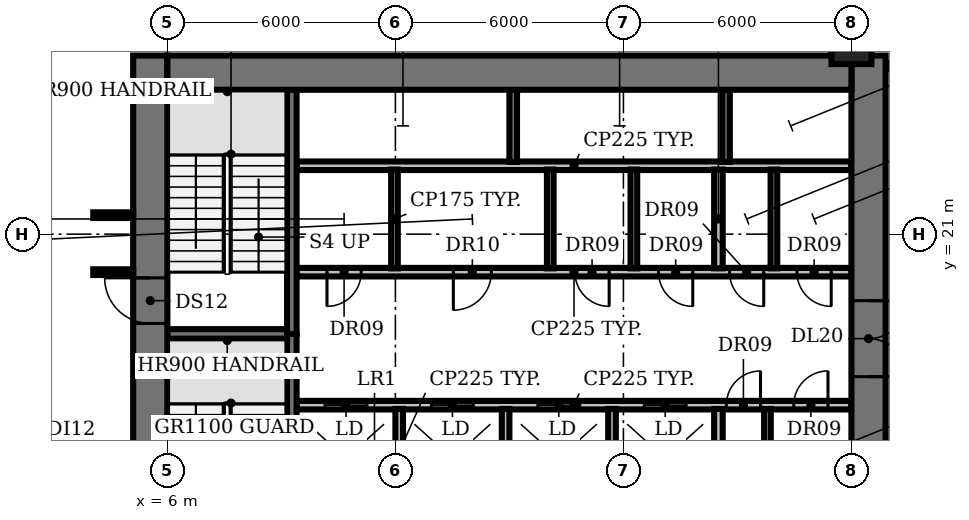
"""IFC4 building model, lengths in metres.
Left out: names, types, materials, properties, quantities, classifications, styles, units other than length and angle.
Written with IfcOpenShell. Run it as: python <this file> out.ifc"""

import sys

from ifc_helpers import new_model, si_unit, direction, frame, frame_2d, origin, origin_2d, place, context, subcontext, project, spatial, rectangle, circle, extrude, element, fill, save


model = new_model("IFC4")
c1 = context("Model", 3, precision=1e-05, world=origin(), true_north=direction((0.0, 1.0)))
c2 = subcontext(c1, "Body", "Model", "MODEL_VIEW")
j1 = project(units=[si_unit("LENGTHUNIT", "METRE"), si_unit("PLANEANGLEUNIT", "RADIAN")], contexts=[c1])
p1 = place(None, origin())
s1 = spatial("IfcSite", under=j1, at=p1, CompositionType="ELEMENT")
p2 = place(p1, origin())
s2 = spatial("IfcBuilding", under=s1, at=p2, CompositionType="ELEMENT")
p3 = place(p2, frame((0.0, 0.0, 29.0)))
s3 = spatial("IfcBuildingStorey", under=s2, at=p3, CompositionType="ELEMENT", Elevation=29.0)
p4 = place(p3, frame((24.0, 26.0, 0.0), z_axis=(0.0, 0.0, 1.0), x_axis=(1.0, 0.0, 0.0)))
e1 = element("IfcColumn", 1, at=p4, inside=s3, PredefinedType="COLUMN", context=c2, shape_type="SweptSolid", body=[
    extrude(circle(Radius=0.525, at=origin_2d()), origin(), (0.0, 0.0, 1.0), 3.85),
])
p5 = place(p3, frame((9.4, 16.5, 0.0), z_axis=(0.0, 0.0, 1.0), x_axis=(1.0, 0.0, 0.0)))
e2 = element("IfcWall", 2, at=p5, inside=s3, PredefinedType="PARTITIONING", context=c2, shape_type="SweptSolid", body=[
    extrude(rectangle(XDim=14.6, YDim=0.225, at=frame_2d((7.3, 0.0))), origin(), (0.0, 0.0, 1.0), 3.85),
])
p6 = place(p5, frame((0.75, 0.0, 0.0)))
e3 = element("IfcOpeningElement", 3, at=p6, cuts=e2, PredefinedType="OPENING", context=c2, shape_type="SweptSolid", body=[
    extrude(rectangle(XDim=1.1, YDim=2.1, at=frame_2d((0.55, 1.05))), frame((0.0, 0.123, 0.0), z_axis=(0.0, -1.0, 0.0), x_axis=(1.0, 0.0, 0.0)), (0.0, 0.0, 1.0), 0.245),
])
p7 = place(p5, frame((3.55, 0.0, 0.0)))
e4 = element("IfcOpeningElement", 4, at=p7, cuts=e2, PredefinedType="OPENING", context=c2, shape_type="SweptSolid", body=[
    extrude(rectangle(XDim=1.1, YDim=2.1, at=frame_2d((0.55, 1.05))), frame((0.0, 0.123, 0.0), z_axis=(0.0, -1.0, 0.0), x_axis=(1.0, 0.0, 0.0)), (0.0, 0.0, 1.0), 0.245),
])
p8 = place(p5, frame((6.35, 0.0, 0.0)))
e5 = element("IfcOpeningElement", 5, at=p8, cuts=e2, PredefinedType="OPENING", context=c2, shape_type="SweptSolid", body=[
    extrude(rectangle(XDim=1.1, YDim=2.1, at=frame_2d((0.55, 1.05))), frame((0.0, 0.123, 0.0), z_axis=(0.0, -1.0, 0.0), x_axis=(1.0, 0.0, 0.0)), (0.0, 0.0, 1.0), 0.245),
])
p9 = place(p5, frame((9.15, 0.0, 0.0)))
e6 = element("IfcOpeningElement", 6, at=p9, cuts=e2, PredefinedType="OPENING", context=c2, shape_type="SweptSolid", body=[
    extrude(rectangle(XDim=1.1, YDim=2.1, at=frame_2d((0.55, 1.05))), frame((0.0, 0.123, 0.0), z_axis=(0.0, -1.0, 0.0), x_axis=(1.0, 0.0, 0.0)), (0.0, 0.0, 1.0), 0.245),
])
p10 = place(p5, frame((11.308, 0.0, 0.0)))
e7 = element("IfcOpeningElement", 7, at=p10, cuts=e2, PredefinedType="OPENING", context=c2, shape_type="SweptSolid", body=[
    extrude(rectangle(XDim=0.9, YDim=2.1, at=frame_2d((0.45, 1.05))), frame((0.0, 0.123, 0.0), z_axis=(0.0, -1.0, 0.0), x_axis=(1.0, 0.0, 0.0)), (0.0, 0.0, 1.0), 0.245),
])
p11 = place(p5, frame((13.083, 0.0, 0.0)))
e8 = element("IfcOpeningElement", 8, at=p11, cuts=e2, PredefinedType="OPENING", context=c2, shape_type="SweptSolid", body=[
    extrude(rectangle(XDim=0.9, YDim=2.1, at=frame_2d((0.45, 1.05))), frame((0.0, 0.123, 0.0), z_axis=(0.0, -1.0, 0.0), x_axis=(1.0, 0.0, 0.0)), (0.0, 0.0, 1.0), 0.245),
])
p12 = place(p3, frame((6.0, 18.375, 0.0), z_axis=(0.0, 0.0, 1.0), x_axis=(1.0, 0.0, 0.0)))
e9 = element("IfcWall", 9, at=p12, inside=s3, PredefinedType="SHEAR", context=c2, shape_type="SweptSolid", body=[
    extrude(rectangle(XDim=3.15, YDim=0.25, at=frame_2d((1.575, 0.0))), origin(), (0.0, 0.0, 1.0), 3.85),
])
p13 = place(p3, frame((24.0, 20.0, 0.0), z_axis=(0.0, 0.0, 1.0), x_axis=(-1.0, 0.0, 0.0)))
e10 = element("IfcWall", 10, at=p13, inside=s3, PredefinedType="PARTITIONING", context=c2, shape_type="SweptSolid", body=[
    extrude(rectangle(XDim=14.6, YDim=0.225, at=frame_2d((7.3, 0.0))), origin(), (0.0, 0.0, 1.0), 3.85),
])
p14 = place(p13, frame((12.9, 0.0, 0.0)))
e11 = element("IfcOpeningElement", 11, at=p14, cuts=e10, PredefinedType="OPENING", context=c2, shape_type="SweptSolid", body=[
    extrude(rectangle(XDim=0.9, YDim=2.1, at=frame_2d((0.45, 1.05))), frame((0.0, 0.123, 0.0), z_axis=(0.0, -1.0, 0.0), x_axis=(1.0, 0.0, 0.0)), (0.0, 0.0, 1.0), 0.245),
])
p15 = place(p13, frame((9.475, 0.0, 0.0)))
e12 = element("IfcOpeningElement", 12, at=p15, cuts=e10, PredefinedType="OPENING", context=c2, shape_type="SweptSolid", body=[
    extrude(rectangle(XDim=1.0, YDim=2.1, at=frame_2d((0.5, 1.05))), frame((0.0, 0.123, 0.0), z_axis=(0.0, -1.0, 0.0), x_axis=(1.0, 0.0, 0.0)), (0.0, 0.0, 1.0), 0.245),
])
p16 = place(p13, frame((6.375, 0.0, 0.0)))
e13 = element("IfcOpeningElement", 13, at=p16, cuts=e10, PredefinedType="OPENING", context=c2, shape_type="SweptSolid", body=[
    extrude(rectangle(XDim=0.9, YDim=2.1, at=frame_2d((0.45, 1.05))), frame((0.0, 0.123, 0.0), z_axis=(0.0, -1.0, 0.0), x_axis=(1.0, 0.0, 0.0)), (0.0, 0.0, 1.0), 0.245),
])
p17 = place(p13, frame((4.175, 0.0, 0.0)))
e14 = element("IfcOpeningElement", 14, at=p17, cuts=e10, PredefinedType="OPENING", context=c2, shape_type="SweptSolid", body=[
    extrude(rectangle(XDim=0.9, YDim=2.1, at=frame_2d((0.45, 1.05))), frame((0.0, 0.123, 0.0), z_axis=(0.0, -1.0, 0.0), x_axis=(1.0, 0.0, 0.0)), (0.0, 0.0, 1.0), 0.245),
])
p18 = place(p13, frame((2.308, 0.0, 0.0)))
e15 = element("IfcOpeningElement", 15, at=p18, cuts=e10, PredefinedType="OPENING", context=c2, shape_type="SweptSolid", body=[
    extrude(rectangle(XDim=0.9, YDim=2.1, at=frame_2d((0.45, 1.05))), frame((0.0, 0.123, 0.0), z_axis=(0.0, -1.0, 0.0), x_axis=(1.0, 0.0, 0.0)), (0.0, 0.0, 1.0), 0.245),
])
p19 = place(p13, frame((0.532, 0.0, 0.0)))
e16 = element("IfcOpeningElement", 16, at=p19, cuts=e10, PredefinedType="OPENING", context=c2, shape_type="SweptSolid", body=[
    extrude(rectangle(XDim=0.9, YDim=2.1, at=frame_2d((0.45, 1.05))), frame((0.0, 0.123, 0.0), z_axis=(0.0, -1.0, 0.0), x_axis=(1.0, 0.0, 0.0)), (0.0, 0.0, 1.0), 0.245),
])
p20 = place(p3, frame((9.4, 22.8, 0.0), z_axis=(0.0, 0.0, 1.0), x_axis=(1.0, 0.0, 0.0)))
e17 = element("IfcWall", 17, at=p20, inside=s3, PredefinedType="PARTITIONING", context=c2, shape_type="SweptSolid", body=[
    extrude(rectangle(XDim=14.6, YDim=0.225, at=frame_2d((7.3, 0.0))), origin(), (0.0, 0.0, 1.0), 3.85),
])
p21 = place(p3, frame((9.275, 18.375, 0.0), z_axis=(0.0, 0.0, 1.0), x_axis=(0.0, -1.0, 0.0)))
e18 = element("IfcWall", 18, at=p21, inside=s3, PredefinedType="SHEAR", context=c2, shape_type="SweptSolid", body=[
    extrude(rectangle(XDim=6.55, YDim=0.25, at=frame_2d((3.275, 0.0))), origin(), (0.0, 0.0, 1.0), 3.85),
])
p22 = place(p21, frame((5.075, 0.0, 0.0)))
e19 = element("IfcOpeningElement", 19, at=p22, cuts=e18, PredefinedType="OPENING", context=c2, shape_type="SweptSolid", body=[
    extrude(rectangle(XDim=1.0, YDim=2.1, at=frame_2d((0.5, 1.05))), frame((0.0, 0.135, 0.0), z_axis=(0.0, -1.0, 0.0), x_axis=(1.0, 0.0, 0.0)), (0.0, 0.0, 1.0), 0.27),
])
p23 = place(p3, frame((9.275, 18.375, 0.0), z_axis=(0.0, 0.0, 1.0), x_axis=(0.0, 1.0, 0.0)))
e20 = element("IfcWall", 20, at=p23, inside=s3, PredefinedType="SHEAR", context=c2, shape_type="SweptSolid", body=[
    extrude(rectangle(XDim=6.425, YDim=0.25, at=frame_2d((3.212, 0.0))), origin(), (0.0, 0.0, 1.0), 3.85),
])
p24 = place(p3, frame((11.975, 20.1, 0.0), z_axis=(0.0, 0.0, 1.0), x_axis=(0.0, 1.0, 0.0)))
e21 = element("IfcWall", 21, at=p24, inside=s3, PredefinedType="PARTITIONING", context=c2, shape_type="SweptSolid", body=[
    extrude(rectangle(XDim=2.6, YDim=0.175, at=frame_2d((1.3, 0.0))), origin(), (0.0, 0.0, 1.0), 3.85),
])
for number, where, z_axis, x_axis in (
    (22, (12.1, 13.8, 0.0), (0.0, 0.0, 1.0), (0.0, 1.0, 0.0)),
    (23, (14.9, 13.8, 0.0), (0.0, 0.0, 1.0), (0.0, 1.0, 0.0)),
):
    element("IfcWall", number, at=place(p3, frame(where, z_axis=z_axis, x_axis=x_axis)), inside=s3, PredefinedType="SOLIDWALL", context=c2, shape_type="SweptSolid", body=[
        extrude(rectangle(XDim=2.6, YDim=0.2, at=frame_2d((1.3, 0.0))), origin(), (0.0, 0.0, 1.0), 3.85),
    ])
p25 = place(p3, frame((15.1, 22.9, 0.0), z_axis=(0.0, 0.0, 1.0), x_axis=(0.0, 1.0, 0.0)))
e24 = element("IfcWall", 24, at=p25, inside=s3, PredefinedType="SHEAR", context=c2, shape_type="SweptSolid", body=[
    extrude(rectangle(XDim=1.9, YDim=0.2, at=frame_2d((0.95, 0.0))), origin(), (0.0, 0.0, 1.0), 3.85),
])
p26 = place(p3, frame((16.075, 20.1, 0.0), z_axis=(0.0, 0.0, 1.0), x_axis=(0.0, 1.0, 0.0)))
e25 = element("IfcWall", 25, at=p26, inside=s3, PredefinedType="PARTITIONING", context=c2, shape_type="SweptSolid", body=[
    extrude(rectangle(XDim=2.6, YDim=0.175, at=frame_2d((1.3, 0.0))), origin(), (0.0, 0.0, 1.0), 3.85),
])
p27 = place(p3, frame((17.7, 13.8, 0.0), z_axis=(0.0, 0.0, 1.0), x_axis=(0.0, 1.0, 0.0)))
e26 = element("IfcWall", 26, at=p27, inside=s3, PredefinedType="SOLIDWALL", context=c2, shape_type="SweptSolid", body=[
    extrude(rectangle(XDim=2.6, YDim=0.2, at=frame_2d((1.3, 0.0))), origin(), (0.0, 0.0, 1.0), 3.85),
])
p28 = place(p3, frame((18.275, 20.1, 0.0), z_axis=(0.0, 0.0, 1.0), x_axis=(0.0, 1.0, 0.0)))
e27 = element("IfcWall", 27, at=p28, inside=s3, PredefinedType="PARTITIONING", context=c2, shape_type="SweptSolid", body=[
    extrude(rectangle(XDim=2.6, YDim=0.175, at=frame_2d((1.3, 0.0))), origin(), (0.0, 0.0, 1.0), 3.85),
])
for number, where, z_axis, x_axis in (
    (28, (20.5, 13.8, 0.0), (0.0, 0.0, 1.0), (0.0, 1.0, 0.0)),
    (29, (20.5, 20.1, 0.0), (0.0, 0.0, 1.0), (0.0, 1.0, 0.0)),
):
    element("IfcWall", number, at=place(p3, frame(where, z_axis=z_axis, x_axis=x_axis)), inside=s3, PredefinedType="PARTITIONING", context=c2, shape_type="SweptSolid", body=[
        extrude(rectangle(XDim=2.6, YDim=0.225, at=frame_2d((1.3, 0.0))), origin(), (0.0, 0.0, 1.0), 3.85),
    ])
p29 = place(p3, frame((20.7, 22.9, 0.0), z_axis=(0.0, 0.0, 1.0), x_axis=(0.0, 1.0, 0.0)))
e30 = element("IfcWall", 30, at=p29, inside=s3, PredefinedType="SHEAR", context=c2, shape_type="SweptSolid", body=[
    extrude(rectangle(XDim=1.9, YDim=0.2, at=frame_2d((0.95, 0.0))), origin(), (0.0, 0.0, 1.0), 3.85),
])
for number, where, z_axis, x_axis in (
    (31, (21.79, 13.8, 0.0), (0.0, 0.0, 1.0), (0.0, 1.0, 0.0)),
    (32, (21.96, 20.1, 0.0), (0.0, 0.0, 1.0), (0.0, 1.0, 0.0)),
):
    element("IfcWall", number, at=place(p3, frame(where, z_axis=z_axis, x_axis=x_axis)), inside=s3, PredefinedType="PARTITIONING", context=c2, shape_type="SweptSolid", body=[
        extrude(rectangle(XDim=2.6, YDim=0.175, at=frame_2d((1.3, 0.0))), origin(), (0.0, 0.0, 1.0), 3.85),
    ])
p30 = place(p3, frame((5.55, 4.5, 0.0), z_axis=(0.0, 0.0, 1.0), x_axis=(0.0, 1.0, 0.0)))
e33 = element("IfcWall", 33, at=p30, inside=s3, PredefinedType="SHEAR", context=c2, shape_type="SweptSolid", body=[
    extrude(rectangle(XDim=21.2, YDim=0.9, at=frame_2d((10.6, 0.0))), origin(), (0.0, 0.0, 1.0), 3.85),
])
p31 = place(p30, frame((1.15, 0.0, 0.0)))
e34 = element("IfcOpeningElement", 34, at=p31, cuts=e33, PredefinedType="OPENING", context=c2, shape_type="SweptSolid", body=[
    extrude(rectangle(XDim=1.5, YDim=2.1, at=frame_2d((0.75, 1.05))), frame((0.0, 0.46, 0.0), z_axis=(0.0, -1.0, 0.0), x_axis=(1.0, 0.0, 0.0)), (0.0, 0.0, 1.0), 0.92),
])
p32 = place(p30, frame((7.6, 0.0, 0.0)))
e35 = element("IfcOpeningElement", 35, at=p32, cuts=e33, PredefinedType="OPENING", context=c2, shape_type="SweptSolid", body=[
    extrude(rectangle(XDim=1.2, YDim=2.1, at=frame_2d((0.6, 1.05))), frame((0.0, 0.46, 0.0), z_axis=(0.0, -1.0, 0.0), x_axis=(1.0, 0.0, 0.0)), (0.0, 0.0, 1.0), 0.92),
])
p33 = place(p30, frame((14.15, 0.0, 0.0)))
e36 = element("IfcOpeningElement", 36, at=p33, cuts=e33, PredefinedType="OPENING", context=c2, shape_type="SweptSolid", body=[
    extrude(rectangle(XDim=1.2, YDim=2.1, at=frame_2d((0.6, 1.05))), frame((0.0, 0.46, 0.0), z_axis=(0.0, -1.0, 0.0), x_axis=(1.0, 0.0, 0.0)), (0.0, 0.0, 1.0), 0.92),
])
p34 = place(p3, frame((24.45, 25.7, 0.0), z_axis=(0.0, 0.0, 1.0), x_axis=(0.0, -1.0, 0.0)))
e37 = element("IfcWall", 37, at=p34, inside=s3, PredefinedType="SHEAR", context=c2, shape_type="SweptSolid", body=[
    extrude(rectangle(XDim=21.2, YDim=0.9, at=frame_2d((10.6, 0.0))), origin(), (0.0, 0.0, 1.0), 3.85),
])
p35 = place(p34, frame((18.55, 0.0, 0.0)))
e38 = element("IfcOpeningElement", 38, at=p35, cuts=e37, PredefinedType="OPENING", context=c2, shape_type="SweptSolid", body=[
    extrude(rectangle(XDim=1.5, YDim=2.1, at=frame_2d((0.75, 1.05))), frame((0.0, 0.46, 0.0), z_axis=(0.0, -1.0, 0.0), x_axis=(1.0, 0.0, 0.0)), (0.0, 0.0, 1.0), 0.92),
])
p36 = place(p34, frame((12.45, 0.0, 0.0)))
e39 = element("IfcOpeningElement", 39, at=p36, cuts=e37, PredefinedType="OPENING", context=c2, shape_type="SweptSolid", body=[
    extrude(rectangle(XDim=0.9, YDim=2.1, at=frame_2d((0.45, 1.05))), frame((0.0, 0.46, 0.0), z_axis=(0.0, -1.0, 0.0), x_axis=(1.0, 0.0, 0.0)), (0.0, 0.0, 1.0), 0.92),
])
p37 = place(p34, frame((6.45, 0.0, 0.0)))
e40 = element("IfcOpeningElement", 40, at=p37, cuts=e37, PredefinedType="OPENING", context=c2, shape_type="SweptSolid", body=[
    extrude(rectangle(XDim=2.0, YDim=2.1, at=frame_2d((1.0, 1.05))), frame((0.0, 0.46, 0.0), z_axis=(0.0, -1.0, 0.0), x_axis=(1.0, 0.0, 0.0)), (0.0, 0.0, 1.0), 0.92),
])
p38 = place(p3, frame((6.0, 25.25, 0.0), z_axis=(0.0, 0.0, 1.0), x_axis=(1.0, 0.0, 0.0)))
e41 = element("IfcWall", 41, at=p38, inside=s3, PredefinedType="SHEAR", context=c2, shape_type="SweptSolid", body=[
    extrude(rectangle(XDim=18.0, YDim=0.9, at=frame_2d((9.0, 0.0))), origin(), (0.0, 0.0, 1.0), 3.85),
])
for number, where, z_axis, x_axis in (
    (42, (4.05, 20.0, 0.0), (0.0, 0.0, 1.0), (1.0, 0.0, 0.0)),
    (43, (4.05, 21.5, 0.0), (0.0, 0.0, 1.0), (1.0, 0.0, 0.0)),
):
    element("IfcWall", number, at=place(p3, frame(where, z_axis=z_axis, x_axis=x_axis)), inside=s3, PredefinedType="PARTITIONING", context=c2, shape_type="SweptSolid", body=[
        extrude(rectangle(XDim=1.05, YDim=0.15, at=frame_2d((0.525, 0.0))), origin(), (0.0, 0.0, 1.0), 2.83),
    ])
p39 = place(p6, origin())
e44 = element("IfcDoor", 44, at=p39, inside=s3, OperationType="DOUBLE_DOOR_SLIDING", PredefinedType="DOOR", context=c2, shape_type="SweptSolid", body=[
    extrude(rectangle(XDim=1.1, YDim=2.1, at=frame_2d((0.55, 1.05))), frame((0.0, 0.025, 0.0), z_axis=(0.0, -1.0, 0.0), x_axis=(1.0, 0.0, 0.0)), (0.0, 0.0, 1.0), 0.05),
])
fill(e3, e44)
p40 = place(p7, origin())
e45 = element("IfcDoor", 45, at=p40, inside=s3, OperationType="DOUBLE_DOOR_SLIDING", PredefinedType="DOOR", context=c2, shape_type="SweptSolid", body=[
    extrude(rectangle(XDim=1.1, YDim=2.1, at=frame_2d((0.55, 1.05))), frame((0.0, 0.025, 0.0), z_axis=(0.0, -1.0, 0.0), x_axis=(1.0, 0.0, 0.0)), (0.0, 0.0, 1.0), 0.05),
])
fill(e4, e45)
p41 = place(p8, origin())
e46 = element("IfcDoor", 46, at=p41, inside=s3, OperationType="DOUBLE_DOOR_SLIDING", PredefinedType="DOOR", context=c2, shape_type="SweptSolid", body=[
    extrude(rectangle(XDim=1.1, YDim=2.1, at=frame_2d((0.55, 1.05))), frame((0.0, 0.025, 0.0), z_axis=(0.0, -1.0, 0.0), x_axis=(1.0, 0.0, 0.0)), (0.0, 0.0, 1.0), 0.05),
])
fill(e5, e46)
p42 = place(p9, origin())
e47 = element("IfcDoor", 47, at=p42, inside=s3, OperationType="DOUBLE_DOOR_SLIDING", PredefinedType="DOOR", context=c2, shape_type="SweptSolid", body=[
    extrude(rectangle(XDim=1.1, YDim=2.1, at=frame_2d((0.55, 1.05))), frame((0.0, 0.025, 0.0), z_axis=(0.0, -1.0, 0.0), x_axis=(1.0, 0.0, 0.0)), (0.0, 0.0, 1.0), 0.05),
])
fill(e6, e47)
p43 = place(p10, origin())
e48 = element("IfcDoor", 48, at=p43, inside=s3, OperationType="SINGLE_SWING_RIGHT", PredefinedType="DOOR", context=c2, shape_type="SweptSolid", body=[
    extrude(rectangle(XDim=0.9, YDim=2.1, at=frame_2d((0.45, 1.05))), frame((0.0, 0.025, 0.0), z_axis=(0.0, -1.0, 0.0), x_axis=(1.0, 0.0, 0.0)), (0.0, 0.0, 1.0), 0.05),
])
fill(e7, e48)
p44 = place(p11, origin())
e49 = element("IfcDoor", 49, at=p44, inside=s3, OperationType="SINGLE_SWING_RIGHT", PredefinedType="DOOR", context=c2, shape_type="SweptSolid", body=[
    extrude(rectangle(XDim=0.9, YDim=2.1, at=frame_2d((0.45, 1.05))), frame((0.0, 0.025, 0.0), z_axis=(0.0, -1.0, 0.0), x_axis=(1.0, 0.0, 0.0)), (0.0, 0.0, 1.0), 0.05),
])
fill(e8, e49)
p45 = place(p14, origin())
e50 = element("IfcDoor", 50, at=p45, inside=s3, OperationType="SINGLE_SWING_RIGHT", PredefinedType="DOOR", context=c2, shape_type="SweptSolid", body=[
    extrude(rectangle(XDim=0.9, YDim=2.1, at=frame_2d((0.45, 1.05))), frame((0.0, 0.025, 0.0), z_axis=(0.0, -1.0, 0.0), x_axis=(1.0, 0.0, 0.0)), (0.0, 0.0, 1.0), 0.05),
])
fill(e11, e50)
p46 = place(p15, origin())
e51 = element("IfcDoor", 51, at=p46, inside=s3, OperationType="SINGLE_SWING_RIGHT", PredefinedType="DOOR", context=c2, shape_type="SweptSolid", body=[
    extrude(rectangle(XDim=1.0, YDim=2.1, at=frame_2d((0.5, 1.05))), frame((0.0, 0.025, 0.0), z_axis=(0.0, -1.0, 0.0), x_axis=(1.0, 0.0, 0.0)), (0.0, 0.0, 1.0), 0.05),
])
fill(e12, e51)
p47 = place(p16, origin())
e52 = element("IfcDoor", 52, at=p47, inside=s3, OperationType="SINGLE_SWING_LEFT", PredefinedType="DOOR", context=c2, shape_type="SweptSolid", body=[
    extrude(rectangle(XDim=0.9, YDim=2.1, at=frame_2d((0.45, 1.05))), frame((0.0, 0.025, 0.0), z_axis=(0.0, -1.0, 0.0), x_axis=(1.0, 0.0, 0.0)), (0.0, 0.0, 1.0), 0.05),
])
fill(e13, e52)
p48 = place(p17, origin())
e53 = element("IfcDoor", 53, at=p48, inside=s3, OperationType="SINGLE_SWING_LEFT", PredefinedType="DOOR", context=c2, shape_type="SweptSolid", body=[
    extrude(rectangle(XDim=0.9, YDim=2.1, at=frame_2d((0.45, 1.05))), frame((0.0, 0.025, 0.0), z_axis=(0.0, -1.0, 0.0), x_axis=(1.0, 0.0, 0.0)), (0.0, 0.0, 1.0), 0.05),
])
fill(e14, e53)
p49 = place(p18, origin())
e54 = element("IfcDoor", 54, at=p49, inside=s3, OperationType="SINGLE_SWING_LEFT", PredefinedType="DOOR", context=c2, shape_type="SweptSolid", body=[
    extrude(rectangle(XDim=0.9, YDim=2.1, at=frame_2d((0.45, 1.05))), frame((0.0, 0.025, 0.0), z_axis=(0.0, -1.0, 0.0), x_axis=(1.0, 0.0, 0.0)), (0.0, 0.0, 1.0), 0.05),
])
fill(e15, e54)
p50 = place(p19, origin())
e55 = element("IfcDoor", 55, at=p50, inside=s3, OperationType="SINGLE_SWING_LEFT", PredefinedType="DOOR", context=c2, shape_type="SweptSolid", body=[
    extrude(rectangle(XDim=0.9, YDim=2.1, at=frame_2d((0.45, 1.05))), frame((0.0, 0.025, 0.0), z_axis=(0.0, -1.0, 0.0), x_axis=(1.0, 0.0, 0.0)), (0.0, 0.0, 1.0), 0.05),
])
fill(e16, e55)
p51 = place(p33, origin())
e56 = element("IfcDoor", 56, at=p51, inside=s3, OperationType="SINGLE_SWING_RIGHT", PredefinedType="DOOR", context=c2, shape_type="SweptSolid", body=[
    extrude(rectangle(XDim=1.2, YDim=2.1, at=frame_2d((0.6, 1.05))), frame((0.0, 0.025, 0.0), z_axis=(0.0, -1.0, 0.0), x_axis=(1.0, 0.0, 0.0)), (0.0, 0.0, 1.0), 0.05),
])
fill(e36, e56)
p52 = place(p37, origin())
e57 = element("IfcDoor", 57, at=p52, inside=s3, OperationType="DOUBLE_DOOR_SINGLE_SWING", PredefinedType="DOOR", context=c2, shape_type="SweptSolid", body=[
    extrude(rectangle(XDim=2.0, YDim=2.1, at=frame_2d((1.0, 1.05))), frame((0.0, 0.025, 0.0), z_axis=(0.0, -1.0, 0.0), x_axis=(1.0, 0.0, 0.0)), (0.0, 0.0, 1.0), 0.05),
])
fill(e40, e57)
save(model, sys.argv[1])
